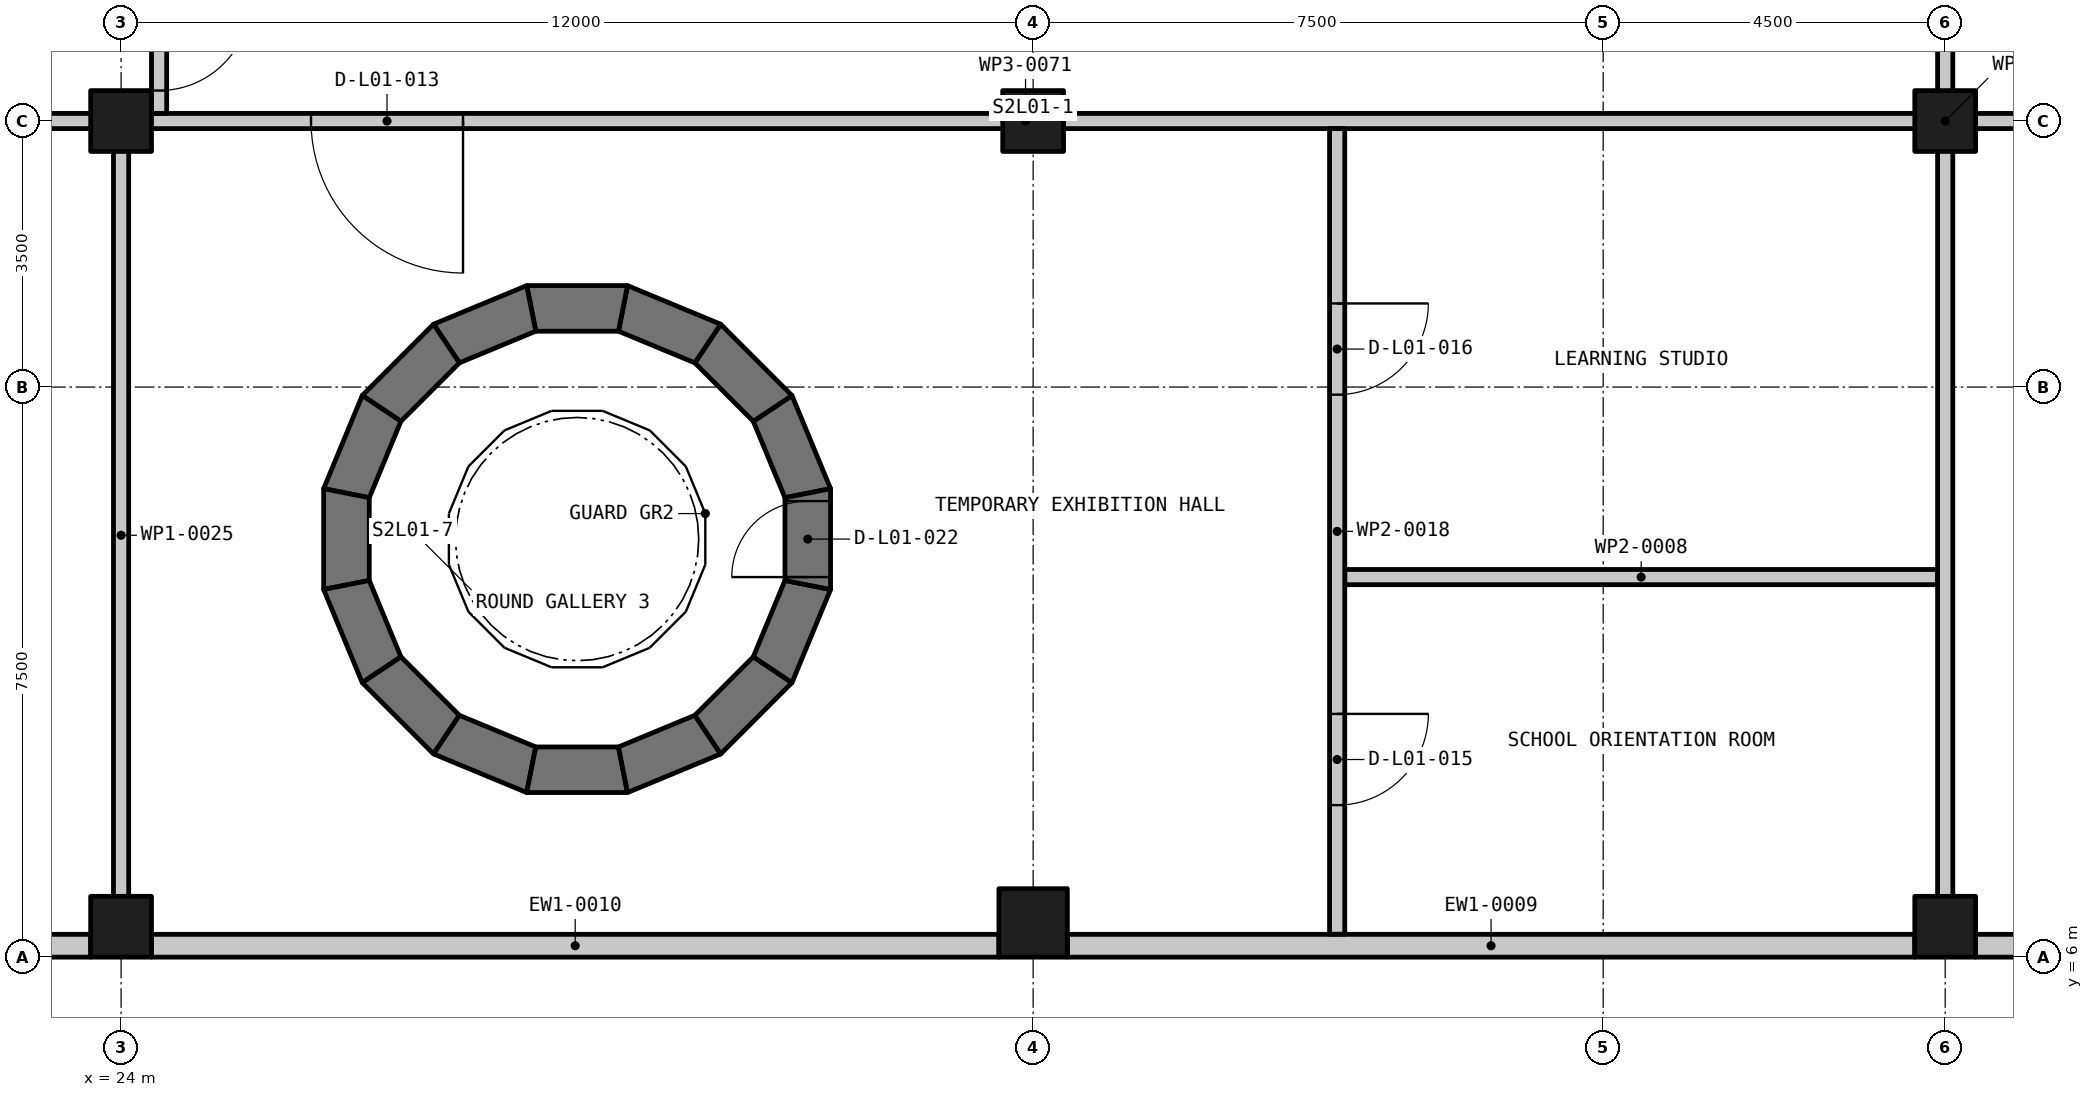
"""IFC4 building model, lengths in metres.
Left out: names, types, materials, properties, quantities, classifications, styles, units other than length and angle.
Written with IfcOpenShell. Run it as: python <this file> out.ifc"""

import sys

from ifc_helpers import new_model, si_unit, direction, frame, frame_2d, origin, origin_2d, place, context, subcontext, project, spatial, polyline, rectangle, outline, extrude, element, fill, save


model = new_model("IFC4")
c1 = context("Model", 3, precision=1e-05, world=origin(), true_north=direction((0.0, 1.0)))
c2 = subcontext(c1, "Body", "Model", "MODEL_VIEW")
j1 = project(units=[si_unit("LENGTHUNIT", "METRE"), si_unit("PLANEANGLEUNIT", "RADIAN")], contexts=[c1])
p1 = place(None, origin())
s1 = spatial("IfcSite", under=j1, at=p1, CompositionType="ELEMENT")
p2 = place(p1, origin())
s2 = spatial("IfcBuilding", under=s1, at=p2, CompositionType="ELEMENT")
p3 = place(p2, frame((0.0, 0.0, 6.0)))
s3 = spatial("IfcBuildingStorey", under=s2, at=p3, CompositionType="ELEMENT", Elevation=6.0)
for number, where, z_axis, x_axis in (
    (1, (24.0, 6.4, -0.3), (0.0, 0.0, 1.0), (1.0, 0.0, 0.0)),
    (2, (24.0, 17.0, -0.3), (0.0, 0.0, 1.0), (1.0, 0.0, 0.0)),
):
    element("IfcColumn", number, at=place(p3, frame(where, z_axis=z_axis, x_axis=x_axis)), inside=s3, PredefinedType="COLUMN", context=c2, shape_type="SweptSolid", body=[
        extrude(rectangle(XDim=0.8, YDim=0.8, at=origin_2d()), origin(), (0.0, 0.0, 1.0), 5.25),
    ])
p4 = place(p3, frame((36.0, 6.45, -0.3), z_axis=(0.0, 0.0, 1.0), x_axis=(1.0, 0.0, 0.0)))
e3 = element("IfcColumn", 3, at=p4, inside=s3, PredefinedType="COLUMN", context=c2, shape_type="SweptSolid", body=[
    extrude(rectangle(XDim=0.9, YDim=0.9, at=origin_2d()), origin(), (0.0, 0.0, 1.0), 5.25),
])
for number, where, z_axis, x_axis in (
    (4, (36.0, 17.0, -0.3), (0.0, 0.0, 1.0), (1.0, 0.0, 0.0)),
    (5, (48.0, 6.4, -0.3), (0.0, 0.0, 1.0), (1.0, 0.0, 0.0)),
    (6, (48.0, 17.0, -0.3), (0.0, 0.0, 1.0), (1.0, 0.0, 0.0)),
):
    element("IfcColumn", number, at=place(p3, frame(where, z_axis=z_axis, x_axis=x_axis)), inside=s3, PredefinedType="COLUMN", context=c2, shape_type="SweptSolid", body=[
        extrude(rectangle(XDim=0.8, YDim=0.8, at=origin_2d()), origin(), (0.0, 0.0, 1.0), 5.25),
    ])
p5 = place(p3, frame((33.058, 12.049, -0.3), z_axis=(0.0, 0.0, 1.0), x_axis=(-0.382785205205, 0.923837370253, 0.0)))
e7 = element("IfcWall", 7, at=p5, inside=s3, PredefinedType="SHEAR", context=c2, shape_type="SweptSolid", body=[
    extrude(outline(polyline([(0.0, -0.3), (1.327, -0.3), (1.207, 0.3), (0.119, 0.3), (0.0, -0.3)])), origin(), (0.0, 0.0, 1.0), 5.25),
])
p6 = place(p3, frame((32.615, 13.177, -0.3), z_axis=(0.0, 0.0, 1.0), x_axis=(-0.707106781187, 0.707106781187, 0.0)))
e8 = element("IfcWall", 8, at=p6, inside=s3, PredefinedType="SHEAR", context=c2, shape_type="SweptSolid", body=[
    extrude(outline(polyline([(0.0, -0.3), (1.326, -0.3), (1.207, 0.3), (0.119, 0.3), (0.0, -0.3)])), origin(), (0.0, 0.0, 1.0), 5.25),
])
p7 = place(p3, frame((31.774, 14.05, -0.3), z_axis=(0.0, 0.0, 1.0), x_axis=(-0.923837370253, 0.382785205205, 0.0)))
e9 = element("IfcWall", 9, at=p7, inside=s3, PredefinedType="SHEAR", context=c2, shape_type="SweptSolid", body=[
    extrude(outline(polyline([(0.0, -0.3), (1.327, -0.3), (1.207, 0.3), (0.119, 0.3), (0.0, -0.3)])), origin(), (0.0, 0.0, 1.0), 5.25),
])
p8 = place(p3, frame((30.663, 14.535, -0.3), z_axis=(0.0, 0.0, 1.0), x_axis=(-1.0, 0.0, 0.0)))
e10 = element("IfcWall", 10, at=p8, inside=s3, PredefinedType="SHEAR", context=c2, shape_type="SweptSolid", body=[
    extrude(outline(polyline([(0.0, -0.3), (1.327, -0.3), (1.207, 0.3), (0.119, 0.3), (0.0, -0.3)])), origin(), (0.0, 0.0, 1.0), 5.25),
])
p9 = place(p3, frame((29.451, 14.558, -0.3), z_axis=(0.0, 0.0, 1.0), x_axis=(-0.923837370253, -0.382785205205, 0.0)))
e11 = element("IfcWall", 11, at=p9, inside=s3, PredefinedType="SHEAR", context=c2, shape_type="SweptSolid", body=[
    extrude(outline(polyline([(0.0, -0.3), (1.327, -0.3), (1.207, 0.3), (0.119, 0.3), (0.0, -0.3)])), origin(), (0.0, 0.0, 1.0), 5.25),
])
p10 = place(p3, frame((28.323, 14.115, -0.3), z_axis=(0.0, 0.0, 1.0), x_axis=(-0.707106781187, -0.707106781187, 0.0)))
e12 = element("IfcWall", 12, at=p10, inside=s3, PredefinedType="SHEAR", context=c2, shape_type="SweptSolid", body=[
    extrude(outline(polyline([(0.0, -0.3), (1.326, -0.3), (1.207, 0.3), (0.119, 0.3), (0.0, -0.3)])), origin(), (0.0, 0.0, 1.0), 5.25),
])
p11 = place(p3, frame((27.45, 13.274, -0.3), z_axis=(0.0, 0.0, 1.0), x_axis=(-0.382785205205, -0.923837370253, 0.0)))
e13 = element("IfcWall", 13, at=p11, inside=s3, PredefinedType="SHEAR", context=c2, shape_type="SweptSolid", body=[
    extrude(outline(polyline([(0.0, -0.3), (1.327, -0.3), (1.207, 0.3), (0.119, 0.3), (0.0, -0.3)])), origin(), (0.0, 0.0, 1.0), 5.25),
])
p12 = place(p3, frame((26.965, 12.163, -0.3), z_axis=(0.0, 0.0, 1.0), x_axis=(0.0, -1.0, 0.0)))
e14 = element("IfcWall", 14, at=p12, inside=s3, PredefinedType="SHEAR", context=c2, shape_type="SweptSolid", body=[
    extrude(outline(polyline([(0.0, -0.3), (1.327, -0.3), (1.207, 0.3), (0.119, 0.3), (0.0, -0.3)])), origin(), (0.0, 0.0, 1.0), 5.25),
])
p13 = place(p3, frame((26.942, 10.951, -0.3), z_axis=(0.0, 0.0, 1.0), x_axis=(0.382785205205, -0.923837370253, 0.0)))
e15 = element("IfcWall", 15, at=p13, inside=s3, PredefinedType="SHEAR", context=c2, shape_type="SweptSolid", body=[
    extrude(outline(polyline([(0.0, -0.3), (1.327, -0.3), (1.207, 0.3), (0.119, 0.3), (0.0, -0.3)])), origin(), (0.0, 0.0, 1.0), 5.25),
])
p14 = place(p3, frame((27.385, 9.823, -0.3), z_axis=(0.0, 0.0, 1.0), x_axis=(0.707106781187, -0.707106781187, 0.0)))
e16 = element("IfcWall", 16, at=p14, inside=s3, PredefinedType="SHEAR", context=c2, shape_type="SweptSolid", body=[
    extrude(outline(polyline([(0.0, -0.3), (1.326, -0.3), (1.207, 0.3), (0.119, 0.3), (0.0, -0.3)])), origin(), (0.0, 0.0, 1.0), 5.25),
])
p15 = place(p3, frame((28.226, 8.95, -0.3), z_axis=(0.0, 0.0, 1.0), x_axis=(0.923837370253, -0.382785205205, 0.0)))
e17 = element("IfcWall", 17, at=p15, inside=s3, PredefinedType="SHEAR", context=c2, shape_type="SweptSolid", body=[
    extrude(outline(polyline([(0.0, -0.3), (1.327, -0.3), (1.207, 0.3), (0.119, 0.3), (0.0, -0.3)])), origin(), (0.0, 0.0, 1.0), 5.25),
])
p16 = place(p3, frame((29.337, 8.465, -0.3), z_axis=(0.0, 0.0, 1.0), x_axis=(1.0, 0.0, 0.0)))
e18 = element("IfcWall", 18, at=p16, inside=s3, PredefinedType="SHEAR", context=c2, shape_type="SweptSolid", body=[
    extrude(outline(polyline([(0.0, -0.3), (1.327, -0.3), (1.207, 0.3), (0.119, 0.3), (0.0, -0.3)])), origin(), (0.0, 0.0, 1.0), 5.25),
])
p17 = place(p3, frame((30.549, 8.442, -0.3), z_axis=(0.0, 0.0, 1.0), x_axis=(0.923837370253, 0.382785205205, 0.0)))
e19 = element("IfcWall", 19, at=p17, inside=s3, PredefinedType="SHEAR", context=c2, shape_type="SweptSolid", body=[
    extrude(outline(polyline([(0.0, -0.3), (1.327, -0.3), (1.207, 0.3), (0.119, 0.3), (0.0, -0.3)])), origin(), (0.0, 0.0, 1.0), 5.25),
])
p18 = place(p3, frame((31.677, 8.885, -0.3), z_axis=(0.0, 0.0, 1.0), x_axis=(0.707106781187, 0.707106781187, 0.0)))
e20 = element("IfcWall", 20, at=p18, inside=s3, PredefinedType="SHEAR", context=c2, shape_type="SweptSolid", body=[
    extrude(outline(polyline([(0.0, -0.3), (1.326, -0.3), (1.207, 0.3), (0.119, 0.3), (0.0, -0.3)])), origin(), (0.0, 0.0, 1.0), 5.25),
])
p19 = place(p3, frame((32.55, 9.726, -0.3), z_axis=(0.0, 0.0, 1.0), x_axis=(0.382785205205, 0.923837370253, 0.0)))
e21 = element("IfcWall", 21, at=p19, inside=s3, PredefinedType="SHEAR", context=c2, shape_type="SweptSolid", body=[
    extrude(outline(polyline([(0.0, -0.3), (1.327, -0.3), (1.207, 0.3), (0.119, 0.3), (0.0, -0.3)])), origin(), (0.0, 0.0, 1.0), 5.25),
])
p20 = place(p3, frame((33.035, 10.837, -0.3), z_axis=(0.0, 0.0, 1.0), x_axis=(0.0, 1.0, 0.0)))
e22 = element("IfcWall", 22, at=p20, inside=s3, PredefinedType="SHEAR", context=c2, shape_type="SweptSolid", body=[
    extrude(outline(polyline([(0.0, -0.3), (1.327, -0.3), (1.207, 0.3), (0.119, 0.3), (0.0, -0.3)])), origin(), (0.0, 0.0, 1.0), 5.25),
])
p21 = place(p20, frame((0.163, 0.0, 0.3)))
e23 = element("IfcOpeningElement", 23, at=p21, cuts=e22, PredefinedType="OPENING", context=c2, shape_type="SweptSolid", body=[
    extrude(rectangle(XDim=1.0, YDim=2.2, at=frame_2d((0.5, 1.1))), frame((0.0, 0.31, 0.0), z_axis=(0.0, -1.0, 0.0), x_axis=(1.0, 0.0, 0.0)), (0.0, 0.0, 1.0), 0.62),
])
p22 = place(p2, origin())
s4 = spatial("IfcBuildingStorey", under=s2, at=p22, CompositionType="ELEMENT", Elevation=0.0)
for number, where, z_axis, x_axis in (
    (24, (36.0, 5.0, -0.2), (0.0, 0.0, 1.0), (1.0, 0.0, 0.0)),
    (25, (44.4, 5.0, -0.2), (0.0, 0.0, 1.0), (1.0, 0.0, 0.0)),
):
    element("IfcWall", number, at=place(p22, frame(where, z_axis=z_axis, x_axis=x_axis)), inside=s4, PredefinedType="SOLIDWALL", context=c2, shape_type="SweptSolid", body=[
        extrude(rectangle(XDim=3.6, YDim=2.0, at=frame_2d((1.8, 0.0))), origin(), (0.0, 0.0, 1.0), 18.2),
    ])
p23 = place(p3, frame((59.6, 6.15, 0.0), z_axis=(0.0, 0.0, 1.0), x_axis=(-1.0, 0.0, 0.0)))
e26 = element("IfcWall", 26, at=p23, inside=s3, PredefinedType="SOLIDWALL", context=c2, shape_type="SweptSolid", body=[
    extrude(rectangle(XDim=11.2, YDim=0.3, at=frame_2d((5.6, 0.0))), origin(), (0.0, 0.0, 1.0), 4.05),
])
p24 = place(p3, frame((47.6, 6.15, 0.0), z_axis=(0.0, 0.0, 1.0), x_axis=(-1.0, 0.0, 0.0)))
e27 = element("IfcWall", 27, at=p24, inside=s3, PredefinedType="SOLIDWALL", context=c2, shape_type="SweptSolid", body=[
    extrude(rectangle(XDim=11.15, YDim=0.3, at=frame_2d((5.575, 0.0))), origin(), (0.0, 0.0, 1.0), 3.95),
])
p25 = place(p3, frame((35.55, 6.15, 0.0), z_axis=(0.0, 0.0, 1.0), x_axis=(-1.0, 0.0, 0.0)))
e28 = element("IfcWall", 28, at=p25, inside=s3, PredefinedType="SOLIDWALL", context=c2, shape_type="SweptSolid", body=[
    extrude(rectangle(XDim=11.15, YDim=0.3, at=frame_2d((5.575, 0.0))), origin(), (0.0, 0.0, 1.0), 4.05),
])
p26 = place(p3, frame((23.6, 6.15, 0.0), z_axis=(0.0, 0.0, 1.0), x_axis=(-1.0, 0.0, 0.0)))
e29 = element("IfcWall", 29, at=p26, inside=s3, PredefinedType="SOLIDWALL", context=c2, shape_type="SweptSolid", body=[
    extrude(rectangle(XDim=11.2, YDim=0.3, at=frame_2d((5.6, 0.0))), origin(), (0.0, 0.0, 1.0), 4.05),
])
p27 = place(p26, frame((7.85, 0.0, 0.75)))
e30 = element("IfcOpeningElement", 30, at=p27, cuts=e29, PredefinedType="OPENING", context=c2, shape_type="SweptSolid", body=[
    extrude(rectangle(XDim=1.5, YDim=2.25, at=frame_2d((0.75, 1.125))), frame((0.0, 0.16, 0.0), z_axis=(0.0, -1.0, 0.0), x_axis=(1.0, 0.0, 0.0)), (0.0, 0.0, 1.0), 0.32),
])
p28 = place(p26, frame((1.85, 0.0, 0.75)))
e31 = element("IfcOpeningElement", 31, at=p28, cuts=e29, PredefinedType="OPENING", context=c2, shape_type="SweptSolid", body=[
    extrude(rectangle(XDim=1.5, YDim=2.25, at=frame_2d((0.75, 1.125))), frame((0.0, 0.16, 0.0), z_axis=(0.0, -1.0, 0.0), x_axis=(1.0, 0.0, 0.0)), (0.0, 0.0, 1.0), 0.32),
])
p29 = place(p22, frame((39.6, 5.0, 4.2), z_axis=(0.0, 0.0, 1.0), x_axis=(1.0, 0.0, 0.0)))
e32 = element("IfcWall", 32, at=p29, inside=s4, PredefinedType="SOLIDWALL", context=c2, shape_type="SweptSolid", body=[
    extrude(rectangle(XDim=4.8, YDim=2.0, at=frame_2d((2.4, 0.0))), origin(), (0.0, 0.0, 1.0), 13.8),
])
p30 = place(p3, frame((40.1, 11.0, 0.0), z_axis=(0.0, 0.0, 1.0), x_axis=(1.0, 0.0, 0.0)))
e33 = element("IfcWall", 33, at=p30, inside=s3, PredefinedType="PARTITIONING", context=c2, shape_type="SweptSolid", body=[
    extrude(rectangle(XDim=7.8, YDim=0.2, at=frame_2d((3.9, 0.0))), origin(), (0.0, 0.0, 1.0), 4.05),
])
p31 = place(p3, frame((65.9, 17.0, 0.0), z_axis=(0.0, 0.0, 1.0), x_axis=(-1.0, 0.0, 0.0)))
e34 = element("IfcWall", 34, at=p31, inside=s3, PredefinedType="PARTITIONING", context=c2, shape_type="SweptSolid", body=[
    extrude(rectangle(XDim=60.0, YDim=0.2, at=frame_2d((30.0, 0.0))), origin(), (0.0, 0.0, 1.0), 4.05),
])
p32 = place(p31, frame((50.75, 0.0, 0.0)))
e35 = element("IfcOpeningElement", 35, at=p32, cuts=e34, PredefinedType="OPENING", context=c2, shape_type="SweptSolid", body=[
    extrude(rectangle(XDim=1.5, YDim=2.1, at=frame_2d((0.75, 1.05))), frame((0.0, 0.11, 0.0), z_axis=(0.0, -1.0, 0.0), x_axis=(1.0, 0.0, 0.0)), (0.0, 0.0, 1.0), 0.22),
])
p33 = place(p31, frame((37.401, 0.0, 0.0)))
e36 = element("IfcOpeningElement", 36, at=p33, cuts=e34, PredefinedType="OPENING", context=c2, shape_type="SweptSolid", body=[
    extrude(rectangle(XDim=2.0, YDim=2.1, at=frame_2d((1.0, 1.05))), frame((0.0, 0.11, 0.0), z_axis=(0.0, -1.0, 0.0), x_axis=(1.0, 0.0, 0.0)), (0.0, 0.0, 1.0), 0.22),
])
p34 = place(p31, frame((11.15, 0.0, 0.0)))
e37 = element("IfcOpeningElement", 37, at=p34, cuts=e34, PredefinedType="OPENING", context=c2, shape_type="SweptSolid", body=[
    extrude(rectangle(XDim=1.5, YDim=2.1, at=frame_2d((0.75, 1.05))), frame((0.0, 0.11, 0.0), z_axis=(0.0, -1.0, 0.0), x_axis=(1.0, 0.0, 0.0)), (0.0, 0.0, 1.0), 0.22),
])
p35 = place(p31, frame((2.251, 0.0, 0.0)))
e38 = element("IfcOpeningElement", 38, at=p35, cuts=e34, PredefinedType="OPENING", context=c2, shape_type="SweptSolid", body=[
    extrude(rectangle(XDim=2.0, YDim=2.1, at=frame_2d((1.0, 1.05))), frame((0.0, 0.11, 0.0), z_axis=(0.0, -1.0, 0.0), x_axis=(1.0, 0.0, 0.0)), (0.0, 0.0, 1.0), 0.22),
])
p36 = place(p3, frame((48.0, 6.2, 0.0), z_axis=(0.0, 0.0, 1.0), x_axis=(0.0, 1.0, 0.0)))
e39 = element("IfcWall", 39, at=p36, inside=s3, PredefinedType="PARTITIONING", context=c2, shape_type="SweptSolid", body=[
    extrude(rectangle(XDim=21.6, YDim=0.2, at=frame_2d((10.8, 0.0))), origin(), (0.0, 0.0, 1.0), 4.05),
])
p37 = place(p3, frame((40.0, 16.9, 0.0), z_axis=(0.0, 0.0, 1.0), x_axis=(0.0, -1.0, 0.0)))
e40 = element("IfcWall", 40, at=p37, inside=s3, PredefinedType="PARTITIONING", context=c2, shape_type="SweptSolid", body=[
    extrude(rectangle(XDim=10.598, YDim=0.2, at=frame_2d((5.299, 0.0))), origin(), (0.0, 0.0, 1.0), 3.95),
])
p38 = place(p37, frame((7.7, 0.0, 0.0)))
e41 = element("IfcOpeningElement", 41, at=p38, cuts=e40, PredefinedType="OPENING", context=c2, shape_type="SweptSolid", body=[
    extrude(rectangle(XDim=1.2, YDim=2.1, at=frame_2d((0.6, 1.05))), frame((0.0, 0.11, 0.0), z_axis=(0.0, -1.0, 0.0), x_axis=(1.0, 0.0, 0.0)), (0.0, 0.0, 1.0), 0.22),
])
p39 = place(p37, frame((2.3, 0.0, 0.0)))
e42 = element("IfcOpeningElement", 42, at=p39, cuts=e40, PredefinedType="OPENING", context=c2, shape_type="SweptSolid", body=[
    extrude(rectangle(XDim=1.2, YDim=2.1, at=frame_2d((0.6, 1.05))), frame((0.0, 0.11, 0.0), z_axis=(0.0, -1.0, 0.0), x_axis=(1.0, 0.0, 0.0)), (0.0, 0.0, 1.0), 0.22),
])
p40 = place(p3, frame((24.5, 18.998, 0.0), z_axis=(0.0, 0.0, 1.0), x_axis=(0.0, -1.0, 0.0)))
e43 = element("IfcWall", 43, at=p40, inside=s3, PredefinedType="PARTITIONING", context=c2, shape_type="SweptSolid", body=[
    extrude(rectangle(XDim=1.898, YDim=0.2, at=frame_2d((0.949, 0.0))), origin(), (0.0, 0.0, 1.0), 4.05),
])
p41 = place(p40, frame((0.397, 0.0, 0.0)))
e44 = element("IfcOpeningElement", 44, at=p41, cuts=e43, PredefinedType="OPENING", context=c2, shape_type="SweptSolid", body=[
    extrude(rectangle(XDim=1.2, YDim=2.1, at=frame_2d((0.6, 1.05))), frame((0.0, 0.11, 0.0), z_axis=(0.0, -1.0, 0.0), x_axis=(1.0, 0.0, 0.0)), (0.0, 0.0, 1.0), 0.22),
])
p42 = place(p3, frame((24.0, 6.2, 0.0), z_axis=(0.0, 0.0, 1.0), x_axis=(0.0, 1.0, 0.0)))
e45 = element("IfcWall", 45, at=p42, inside=s3, PredefinedType="PARTITIONING", context=c2, shape_type="SweptSolid", body=[
    extrude(rectangle(XDim=10.7, YDim=0.2, at=frame_2d((5.35, 0.0))), origin(), (0.0, 0.0, 1.0), 4.05),
])
p43 = place(p33, origin())
e46 = element("IfcDoor", 46, at=p43, inside=s3, OperationType="DOUBLE_DOOR_SINGLE_SWING", PredefinedType="DOOR", context=c2, shape_type="SweptSolid", body=[
    extrude(rectangle(XDim=2.0, YDim=2.1, at=frame_2d((1.0, 1.05))), frame((0.0, 0.025, 0.0), z_axis=(0.0, -1.0, 0.0), x_axis=(1.0, 0.0, 0.0)), (0.0, 0.0, 1.0), 0.05),
])
fill(e36, e46)
p44 = place(p38, origin())
e47 = element("IfcDoor", 47, at=p44, inside=s3, OperationType="SINGLE_SWING_LEFT", PredefinedType="DOOR", context=c2, shape_type="SweptSolid", body=[
    extrude(rectangle(XDim=1.2, YDim=2.1, at=frame_2d((0.6, 1.05))), frame((0.0, 0.025, 0.0), z_axis=(0.0, -1.0, 0.0), x_axis=(1.0, 0.0, 0.0)), (0.0, 0.0, 1.0), 0.05),
])
fill(e41, e47)
p45 = place(p39, origin())
e48 = element("IfcDoor", 48, at=p45, inside=s3, OperationType="SINGLE_SWING_RIGHT", PredefinedType="DOOR", context=c2, shape_type="SweptSolid", body=[
    extrude(rectangle(XDim=1.2, YDim=2.1, at=frame_2d((0.6, 1.05))), frame((0.0, 0.025, 0.0), z_axis=(0.0, -1.0, 0.0), x_axis=(1.0, 0.0, 0.0)), (0.0, 0.0, 1.0), 0.05),
])
fill(e42, e48)
p46 = place(p41, origin())
e49 = element("IfcDoor", 49, at=p46, inside=s3, OperationType="SINGLE_SWING_LEFT", PredefinedType="DOOR", context=c2, shape_type="SweptSolid", body=[
    extrude(rectangle(XDim=1.2, YDim=2.1, at=frame_2d((0.6, 1.05))), frame((0.0, 0.025, 0.0), z_axis=(0.0, -1.0, 0.0), x_axis=(1.0, 0.0, 0.0)), (0.0, 0.0, 1.0), 0.05),
])
fill(e44, e49)
p47 = place(p21, origin())
e50 = element("IfcDoor", 50, at=p47, inside=s3, OperationType="SINGLE_SWING_LEFT", PredefinedType="DOOR", context=c2, shape_type="SweptSolid", body=[
    extrude(rectangle(XDim=1.0, YDim=2.2, at=frame_2d((0.5, 1.1))), frame((0.0, 0.025, 0.0), z_axis=(0.0, -1.0, 0.0), x_axis=(1.0, 0.0, 0.0)), (0.0, 0.0, 1.0), 0.05),
])
fill(e23, e50)
save(model, sys.argv[1])
